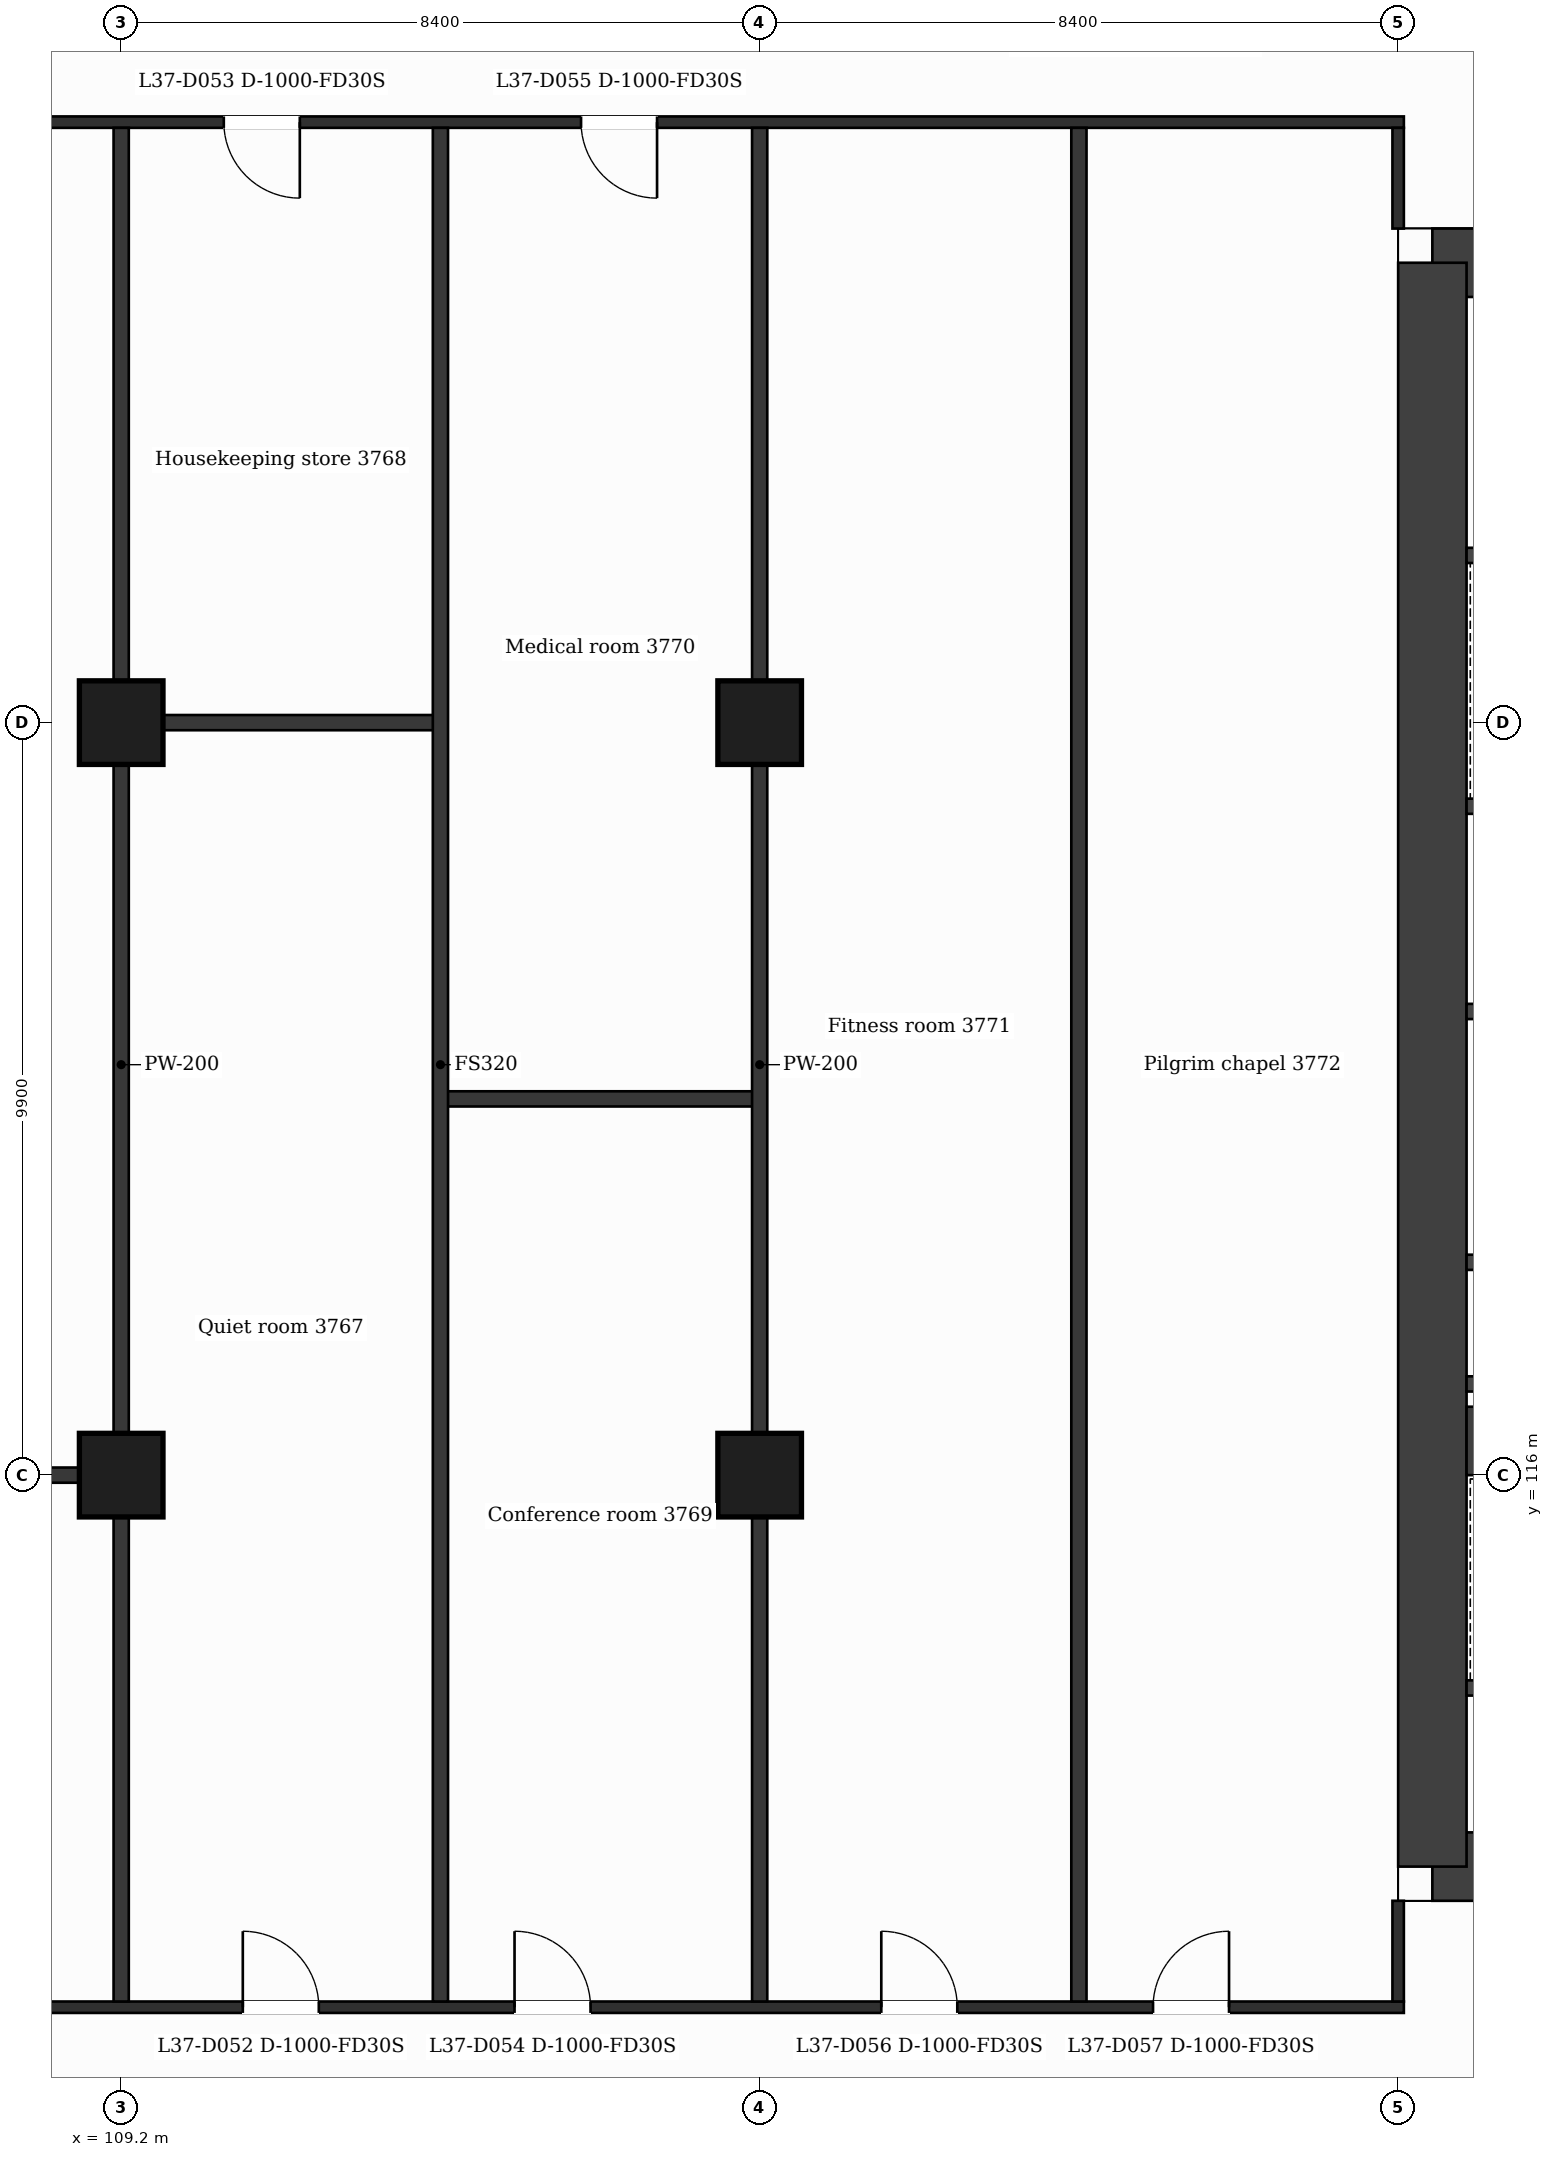
"""IFC4 building model, lengths in metres.
Left out: names, types, materials, properties, quantities, classifications, styles, units other than length and angle.
Written with IfcOpenShell. Run it as: python <this file> out.ifc"""

import sys

from ifc_helpers import new_model, si_unit, direction, frame, frame_2d, origin, origin_2d, place, context, subcontext, project, spatial, rectangle, extrude, element, fill, save


model = new_model("IFC4")
c1 = context("Model", 3, precision=1e-05, world=origin(), true_north=direction((0.0, 1.0)))
c2 = subcontext(c1, "Body", "Model", "MODEL_VIEW")
j1 = project(units=[si_unit("LENGTHUNIT", "METRE"), si_unit("PLANEANGLEUNIT", "RADIAN")], contexts=[c1])
p1 = place(None, origin())
s1 = spatial("IfcSite", under=j1, at=p1, CompositionType="ELEMENT")
p2 = place(p1, origin())
s2 = spatial("IfcBuilding", under=s1, at=p2, CompositionType="ELEMENT")
p3 = place(p2, frame((0.0, 0.0, 158.9)))
s3 = spatial("IfcBuildingStorey", under=s2, at=p3, CompositionType="ELEMENT", Elevation=158.9)
p4 = place(p3, frame((126.45, 131.95, 0.0), z_axis=(0.0, 0.0, 1.0), x_axis=(1.0, 0.0, 0.0)))
e1 = element("IfcWall", 1, at=p4, inside=s3, PredefinedType="SHEAR", context=c2, shape_type="SweptSolid", body=[
    extrude(rectangle(XDim=11.326, YDim=0.9, at=frame_2d((5.663, 0.0))), origin(), (0.0, 0.0, 1.0), 3.7),
])
p5 = place(p4, frame((3.386, 0.0, 0.0)))
e2 = element("IfcOpeningElement", 2, at=p5, cuts=e1, PredefinedType="OPENING", context=c2, shape_type="SweptSolid", body=[
    extrude(rectangle(XDim=1.2, YDim=2.1, at=frame_2d((0.6, 1.05))), frame((0.0, 0.46, 0.0), z_axis=(0.0, -1.0, 0.0), x_axis=(1.0, 0.0, 0.0)), (0.0, 0.0, 1.0), 0.92),
])
p6 = place(p3, frame((140.616, 110.85, 0.0), z_axis=(0.0, 0.0, 1.0), x_axis=(-1.0, 0.0, 0.0)))
e3 = element("IfcWall", 3, at=p6, inside=s3, PredefinedType="SHEAR", context=c2, shape_type="SweptSolid", body=[
    extrude(rectangle(XDim=14.166, YDim=0.9, at=frame_2d((7.083, 0.0))), origin(), (0.0, 0.0, 1.0), 3.7),
])
p7 = place(p6, frame((6.911, 0.0, 0.0)))
e4 = element("IfcOpeningElement", 4, at=p7, cuts=e3, PredefinedType="OPENING", context=c2, shape_type="SweptSolid", body=[
    extrude(rectangle(XDim=1.4, YDim=2.1, at=frame_2d((0.7, 1.05))), frame((0.0, 0.46, 0.0), z_axis=(0.0, -1.0, 0.0), x_axis=(1.0, 0.0, 0.0)), (0.0, 0.0, 1.0), 0.92),
])
p8 = place(p3, frame((126.45, 110.85, 0.0), z_axis=(0.0, 0.0, 1.0), x_axis=(0.0, 1.0, 0.0)))
e5 = element("IfcWall", 5, at=p8, inside=s3, PredefinedType="SHEAR", context=c2, shape_type="SweptSolid", body=[
    extrude(rectangle(XDim=21.1, YDim=0.9, at=frame_2d((10.55, 0.0))), origin(), (0.0, 0.0, 1.0), 3.7),
])
p9 = place(p3, frame((126.9, 116.45, 0.0), z_axis=(0.0, 0.0, 1.0), x_axis=(1.0, 0.0, 0.0)))
e6 = element("IfcWall", 6, at=p9, inside=s3, PredefinedType="SHEAR", context=c2, shape_type="SweptSolid", body=[
    extrude(rectangle(XDim=5.1, YDim=0.9, at=frame_2d((2.55, 0.0))), origin(), (0.0, 0.0, 1.0), 3.7),
])
for number, where, z_axis, x_axis in (
    (7, (109.2, 116.0, 0.0), (0.0, 0.0, 1.0), (1.0, 0.0, 0.0)),
    (8, (117.6, 116.0, 0.0), (0.0, 0.0, 1.0), (1.0, 0.0, 0.0)),
    (9, (109.2, 125.9, 0.0), (0.0, 0.0, 1.0), (1.0, 0.0, 0.0)),
    (10, (117.6, 125.9, 0.0), (0.0, 0.0, 1.0), (1.0, 0.0, 0.0)),
):
    element("IfcColumn", number, at=place(p3, frame(where, z_axis=z_axis, x_axis=x_axis)), inside=s3, PredefinedType="COLUMN", context=c2, shape_type="SweptSolid", body=[
        extrude(rectangle(XDim=1.1, YDim=1.1, at=origin_2d()), origin(), (0.0, 0.0, 1.0), 3.7),
    ])
p10 = place(p3, frame((100.725, 109.0, 0.0), z_axis=(0.0, 0.0, 1.0), x_axis=(1.0, 0.0, 0.0)))
e11 = element("IfcWall", 11, at=p10, inside=s3, PredefinedType="PARTITIONING", context=c2, shape_type="SweptSolid", body=[
    extrude(rectangle(XDim=25.35, YDim=0.15, at=frame_2d((12.675, 0.0))), origin(), (0.0, 0.0, 1.0), 3.38),
])
p11 = place(p10, frame((2.1, 0.0, 0.0)))
e12 = element("IfcOpeningElement", 12, at=p11, cuts=e11, PredefinedType="OPENING", context=c2, shape_type="SweptSolid", body=[
    extrude(rectangle(XDim=1.0, YDim=2.1, at=frame_2d((0.5, 1.05))), frame((0.0, 0.085, 0.0), z_axis=(0.0, -1.0, 0.0), x_axis=(1.0, 0.0, 0.0)), (0.0, 0.0, 1.0), 0.17),
])
p12 = place(p10, frame((10.075, 0.0, 0.0)))
e13 = element("IfcOpeningElement", 13, at=p12, cuts=e11, PredefinedType="OPENING", context=c2, shape_type="SweptSolid", body=[
    extrude(rectangle(XDim=1.0, YDim=2.1, at=frame_2d((0.5, 1.05))), frame((0.0, 0.085, 0.0), z_axis=(0.0, -1.0, 0.0), x_axis=(1.0, 0.0, 0.0)), (0.0, 0.0, 1.0), 0.17),
])
p13 = place(p10, frame((13.65, 0.0, 0.0)))
e14 = element("IfcOpeningElement", 14, at=p13, cuts=e11, PredefinedType="OPENING", context=c2, shape_type="SweptSolid", body=[
    extrude(rectangle(XDim=1.0, YDim=2.1, at=frame_2d((0.5, 1.05))), frame((0.0, 0.085, 0.0), z_axis=(0.0, -1.0, 0.0), x_axis=(1.0, 0.0, 0.0)), (0.0, 0.0, 1.0), 0.17),
])
p14 = place(p10, frame((18.475, 0.0, 0.0)))
e15 = element("IfcOpeningElement", 15, at=p14, cuts=e11, PredefinedType="OPENING", context=c2, shape_type="SweptSolid", body=[
    extrude(rectangle(XDim=1.0, YDim=2.1, at=frame_2d((0.5, 1.05))), frame((0.0, 0.085, 0.0), z_axis=(0.0, -1.0, 0.0), x_axis=(1.0, 0.0, 0.0)), (0.0, 0.0, 1.0), 0.17),
])
p15 = place(p10, frame((22.05, 0.0, 0.0)))
e16 = element("IfcOpeningElement", 16, at=p15, cuts=e11, PredefinedType="OPENING", context=c2, shape_type="SweptSolid", body=[
    extrude(rectangle(XDim=1.0, YDim=2.1, at=frame_2d((0.5, 1.05))), frame((0.0, 0.085, 0.0), z_axis=(0.0, -1.0, 0.0), x_axis=(1.0, 0.0, 0.0)), (0.0, 0.0, 1.0), 0.17),
])
p16 = place(p3, frame((126.9, 113.2, 0.0), z_axis=(0.0, 0.0, 1.0), x_axis=(1.0, 0.0, 0.0)))
e17 = element("IfcWall", 17, at=p16, inside=s3, PredefinedType="PARTITIONING", context=c2, shape_type="SweptSolid", body=[
    extrude(rectangle(XDim=4.773, YDim=0.2, at=frame_2d((2.387, 0.0))), origin(), (0.0, 0.0, 1.0), 3.38),
])
p17 = place(p16, frame((0.565, 0.0, 0.0)))
e18 = element("IfcOpeningElement", 18, at=p17, cuts=e17, PredefinedType="OPENING", context=c2, shape_type="SweptSolid", body=[
    extrude(rectangle(XDim=1.1, YDim=2.1, at=frame_2d((0.55, 1.05))), frame((0.0, 0.11, 0.0), z_axis=(0.0, -1.0, 0.0), x_axis=(1.0, 0.0, 0.0)), (0.0, 0.0, 1.0), 0.22),
])
p18 = place(p3, frame((100.8, 116.0, 0.0), z_axis=(0.0, 0.0, 1.0), x_axis=(1.0, 0.0, 0.0)))
e19 = element("IfcWall", 19, at=p18, inside=s3, PredefinedType="PARTITIONING", context=c2, shape_type="SweptSolid", body=[
    extrude(rectangle(XDim=8.4, YDim=0.2, at=frame_2d((4.2, 0.0))), origin(), (0.0, 0.0, 1.0), 3.38),
])
for number, where, z_axis, x_axis in (
    (20, (126.9, 117.2, 0.0), (0.0, 0.0, 1.0), (1.0, 0.0, 0.0)),
    (21, (126.9, 118.8, 0.0), (0.0, 0.0, 1.0), (1.0, 0.0, 0.0)),
):
    element("IfcWall", number, at=place(p3, frame(where, z_axis=z_axis, x_axis=x_axis)), inside=s3, PredefinedType="PARTITIONING", context=c2, shape_type="SweptSolid", body=[
        extrude(rectangle(XDim=4.673, YDim=0.2, at=frame_2d((2.336, 0.0))), origin(), (0.0, 0.0, 1.0), 3.38),
    ])
p19 = place(p3, frame((113.4, 120.95, 0.0), z_axis=(0.0, 0.0, 1.0), x_axis=(1.0, 0.0, 0.0)))
e22 = element("IfcWall", 22, at=p19, inside=s3, PredefinedType="PARTITIONING", context=c2, shape_type="SweptSolid", body=[
    extrude(rectangle(XDim=4.2, YDim=0.2, at=frame_2d((2.1, 0.0))), origin(), (0.0, 0.0, 1.0), 3.38),
])
p20 = place(p3, frame((126.9, 122.1, 0.0), z_axis=(0.0, 0.0, 1.0), x_axis=(1.0, 0.0, 0.0)))
e23 = element("IfcWall", 23, at=p20, inside=s3, PredefinedType="PARTITIONING", context=c2, shape_type="SweptSolid", body=[
    extrude(rectangle(XDim=4.673, YDim=0.2, at=frame_2d((2.336, 0.0))), origin(), (0.0, 0.0, 1.0), 3.38),
])
p21 = place(p20, frame((3.055, 0.0, 0.0)))
e24 = element("IfcOpeningElement", 24, at=p21, cuts=e23, PredefinedType="OPENING", context=c2, shape_type="SweptSolid", body=[
    extrude(rectangle(XDim=0.9, YDim=2.1, at=frame_2d((0.45, 1.05))), frame((0.0, 0.11, 0.0), z_axis=(0.0, -1.0, 0.0), x_axis=(1.0, 0.0, 0.0)), (0.0, 0.0, 1.0), 0.22),
])
p22 = place(p20, frame((0.902, 0.0, 0.0)))
e25 = element("IfcOpeningElement", 25, at=p22, cuts=e23, PredefinedType="OPENING", context=c2, shape_type="SweptSolid", body=[
    extrude(rectangle(XDim=0.9, YDim=2.1, at=frame_2d((0.45, 1.05))), frame((0.0, 0.11, 0.0), z_axis=(0.0, -1.0, 0.0), x_axis=(1.0, 0.0, 0.0)), (0.0, 0.0, 1.0), 0.22),
])
p23 = place(p3, frame((126.9, 124.8, 0.0), z_axis=(0.0, 0.0, 1.0), x_axis=(1.0, 0.0, 0.0)))
e26 = element("IfcWall", 26, at=p23, inside=s3, PredefinedType="PARTITIONING", context=c2, shape_type="SweptSolid", body=[
    extrude(rectangle(XDim=4.715, YDim=0.2, at=frame_2d((2.358, 0.0))), origin(), (0.0, 0.0, 1.0), 3.38),
])
p24 = place(p23, frame((0.629, 0.0, 0.0)))
e27 = element("IfcOpeningElement", 27, at=p24, cuts=e26, PredefinedType="OPENING", context=c2, shape_type="SweptSolid", body=[
    extrude(rectangle(XDim=1.1, YDim=2.1, at=frame_2d((0.55, 1.05))), frame((0.0, 0.11, 0.0), z_axis=(0.0, -1.0, 0.0), x_axis=(1.0, 0.0, 0.0)), (0.0, 0.0, 1.0), 0.22),
])
p25 = place(p3, frame((109.2, 125.9, 0.0), z_axis=(0.0, 0.0, 1.0), x_axis=(1.0, 0.0, 0.0)))
e28 = element("IfcWall", 28, at=p25, inside=s3, PredefinedType="PARTITIONING", context=c2, shape_type="SweptSolid", body=[
    extrude(rectangle(XDim=4.2, YDim=0.2, at=frame_2d((2.1, 0.0))), origin(), (0.0, 0.0, 1.0), 3.38),
])
p26 = place(p3, frame((126.9, 128.1, 0.0), z_axis=(0.0, 0.0, 1.0), x_axis=(1.0, 0.0, 0.0)))
e29 = element("IfcWall", 29, at=p26, inside=s3, PredefinedType="PARTITIONING", context=c2, shape_type="SweptSolid", body=[
    extrude(rectangle(XDim=4.715, YDim=0.2, at=frame_2d((2.358, 0.0))), origin(), (0.0, 0.0, 1.0), 3.38),
])
p27 = place(p26, frame((3.126, 0.0, 0.0)))
e30 = element("IfcOpeningElement", 30, at=p27, cuts=e29, PredefinedType="OPENING", context=c2, shape_type="SweptSolid", body=[
    extrude(rectangle(XDim=1.1, YDim=2.1, at=frame_2d((0.55, 1.05))), frame((0.0, 0.11, 0.0), z_axis=(0.0, -1.0, 0.0), x_axis=(1.0, 0.0, 0.0)), (0.0, 0.0, 1.0), 0.22),
])
p28 = place(p3, frame((100.725, 133.8, 0.0), z_axis=(0.0, 0.0, 1.0), x_axis=(1.0, 0.0, 0.0)))
e31 = element("IfcWall", 31, at=p28, inside=s3, PredefinedType="PARTITIONING", context=c2, shape_type="SweptSolid", body=[
    extrude(rectangle(XDim=25.35, YDim=0.15, at=frame_2d((12.675, 0.0))), origin(), (0.0, 0.0, 1.0), 3.38),
])
p29 = place(p28, frame((2.1, 0.0, 0.0)))
e32 = element("IfcOpeningElement", 32, at=p29, cuts=e31, PredefinedType="OPENING", context=c2, shape_type="SweptSolid", body=[
    extrude(rectangle(XDim=1.0, YDim=2.1, at=frame_2d((0.5, 1.05))), frame((0.0, 0.085, 0.0), z_axis=(0.0, -1.0, 0.0), x_axis=(1.0, 0.0, 0.0)), (0.0, 0.0, 1.0), 0.17),
])
p30 = place(p28, frame((9.825, 0.0, 0.0)))
e33 = element("IfcOpeningElement", 33, at=p30, cuts=e31, PredefinedType="OPENING", context=c2, shape_type="SweptSolid", body=[
    extrude(rectangle(XDim=1.0, YDim=2.1, at=frame_2d((0.5, 1.05))), frame((0.0, 0.085, 0.0), z_axis=(0.0, -1.0, 0.0), x_axis=(1.0, 0.0, 0.0)), (0.0, 0.0, 1.0), 0.17),
])
p31 = place(p28, frame((14.525, 0.0, 0.0)))
e34 = element("IfcOpeningElement", 34, at=p31, cuts=e31, PredefinedType="OPENING", context=c2, shape_type="SweptSolid", body=[
    extrude(rectangle(XDim=1.0, YDim=2.1, at=frame_2d((0.5, 1.05))), frame((0.0, 0.085, 0.0), z_axis=(0.0, -1.0, 0.0), x_axis=(1.0, 0.0, 0.0)), (0.0, 0.0, 1.0), 0.17),
])
for number, where, z_axis, x_axis in (
    (35, (109.2, 109.075, 0.0), (0.0, 0.0, 1.0), (0.0, 1.0, 0.0)),
    (36, (113.4, 109.075, 0.0), (0.0, 0.0, 1.0), (0.0, 1.0, 0.0)),
    (37, (117.6, 109.075, 0.0), (0.0, 0.0, 1.0), (0.0, 1.0, 0.0)),
    (38, (121.8, 109.075, 0.0), (0.0, 0.0, 1.0), (0.0, 1.0, 0.0)),
):
    element("IfcWall", number, at=place(p3, frame(where, z_axis=z_axis, x_axis=x_axis)), inside=s3, PredefinedType="PARTITIONING", context=c2, shape_type="SweptSolid", body=[
        extrude(rectangle(XDim=24.65, YDim=0.2, at=frame_2d((12.325, 0.0))), origin(), (0.0, 0.0, 1.0), 3.38),
    ])
p32 = place(p3, frame((126.0, 109.075, 0.0), z_axis=(0.0, 0.0, 1.0), x_axis=(0.0, 1.0, 0.0)))
e39 = element("IfcWall", 39, at=p32, inside=s3, PredefinedType="PARTITIONING", context=c2, shape_type="SweptSolid", body=[
    extrude(rectangle(XDim=1.325, YDim=0.15, at=frame_2d((0.663, 0.0))), origin(), (0.0, 0.0, 1.0), 3.38),
])
p33 = place(p3, frame((126.0, 132.4, 0.0), z_axis=(0.0, 0.0, 1.0), x_axis=(0.0, 1.0, 0.0)))
e40 = element("IfcWall", 40, at=p33, inside=s3, PredefinedType="PARTITIONING", context=c2, shape_type="SweptSolid", body=[
    extrude(rectangle(XDim=1.325, YDim=0.15, at=frame_2d((0.663, 0.0))), origin(), (0.0, 0.0, 1.0), 3.38),
])
p34 = place(p12, origin())
e41 = element("IfcDoor", 41, at=p34, inside=s3, OperationType="SINGLE_SWING_LEFT", PredefinedType="DOOR", context=c2, shape_type="SweptSolid", body=[
    extrude(rectangle(XDim=1.0, YDim=2.1, at=frame_2d((0.5, 1.05))), frame((0.0, 0.025, 0.0), z_axis=(0.0, -1.0, 0.0), x_axis=(1.0, 0.0, 0.0)), (0.0, 0.0, 1.0), 0.05),
])
fill(e13, e41)
p35 = place(p30, origin())
e42 = element("IfcDoor", 42, at=p35, inside=s3, OperationType="SINGLE_SWING_RIGHT", PredefinedType="DOOR", context=c2, shape_type="SweptSolid", body=[
    extrude(rectangle(XDim=1.0, YDim=2.1, at=frame_2d((0.5, 1.05))), frame((0.0, 0.025, 0.0), z_axis=(0.0, -1.0, 0.0), x_axis=(1.0, 0.0, 0.0)), (0.0, 0.0, 1.0), 0.05),
])
fill(e33, e42)
p36 = place(p13, origin())
e43 = element("IfcDoor", 43, at=p36, inside=s3, OperationType="SINGLE_SWING_LEFT", PredefinedType="DOOR", context=c2, shape_type="SweptSolid", body=[
    extrude(rectangle(XDim=1.0, YDim=2.1, at=frame_2d((0.5, 1.05))), frame((0.0, 0.025, 0.0), z_axis=(0.0, -1.0, 0.0), x_axis=(1.0, 0.0, 0.0)), (0.0, 0.0, 1.0), 0.05),
])
fill(e14, e43)
p37 = place(p31, origin())
e44 = element("IfcDoor", 44, at=p37, inside=s3, OperationType="SINGLE_SWING_RIGHT", PredefinedType="DOOR", context=c2, shape_type="SweptSolid", body=[
    extrude(rectangle(XDim=1.0, YDim=2.1, at=frame_2d((0.5, 1.05))), frame((0.0, 0.025, 0.0), z_axis=(0.0, -1.0, 0.0), x_axis=(1.0, 0.0, 0.0)), (0.0, 0.0, 1.0), 0.05),
])
fill(e34, e44)
p38 = place(p14, origin())
e45 = element("IfcDoor", 45, at=p38, inside=s3, OperationType="SINGLE_SWING_LEFT", PredefinedType="DOOR", context=c2, shape_type="SweptSolid", body=[
    extrude(rectangle(XDim=1.0, YDim=2.1, at=frame_2d((0.5, 1.05))), frame((0.0, 0.025, 0.0), z_axis=(0.0, -1.0, 0.0), x_axis=(1.0, 0.0, 0.0)), (0.0, 0.0, 1.0), 0.05),
])
fill(e15, e45)
p39 = place(p15, origin())
e46 = element("IfcDoor", 46, at=p39, inside=s3, OperationType="SINGLE_SWING_RIGHT", PredefinedType="DOOR", context=c2, shape_type="SweptSolid", body=[
    extrude(rectangle(XDim=1.0, YDim=2.1, at=frame_2d((0.5, 1.05))), frame((0.0, 0.025, 0.0), z_axis=(0.0, -1.0, 0.0), x_axis=(1.0, 0.0, 0.0)), (0.0, 0.0, 1.0), 0.05),
])
fill(e16, e46)
save(model, sys.argv[1])
